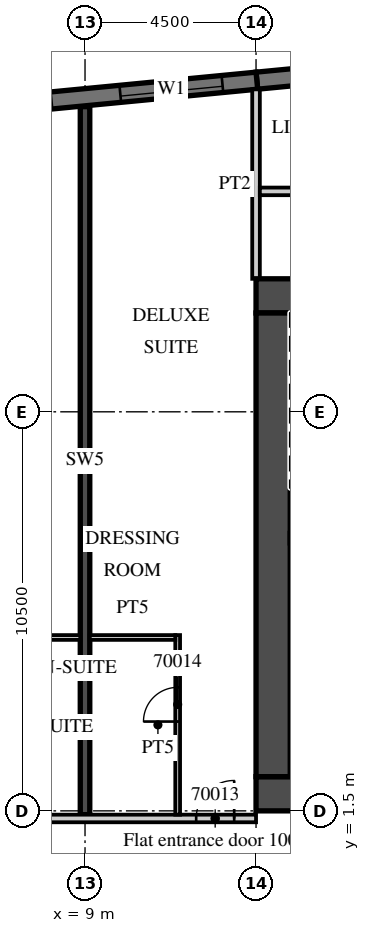
"""IFC4 building model, lengths in metres.
Left out: names, types, materials, properties, quantities, classifications, styles, units other than length and angle.
Written with IfcOpenShell. Run it as: python <this file> out.ifc"""

import sys

from ifc_helpers import new_model, si_unit, direction, frame, frame_2d, origin, place, context, subcontext, project, spatial, rectangle, extrude, element, fill, save


model = new_model("IFC4")
c1 = context("Model", 3, precision=1e-05, world=origin(), true_north=direction((0.0, 1.0)))
c2 = subcontext(c1, "Body", "Model", "MODEL_VIEW")
j1 = project(units=[si_unit("LENGTHUNIT", "METRE"), si_unit("PLANEANGLEUNIT", "RADIAN")], contexts=[c1])
p1 = place(None, origin())
s1 = spatial("IfcSite", under=j1, at=p1, CompositionType="ELEMENT")
p2 = place(p1, origin())
s2 = spatial("IfcBuilding", under=s1, at=p2, CompositionType="ELEMENT")
p3 = place(p2, frame((0.0, 0.0, 281.7)))
s3 = spatial("IfcBuildingStorey", under=s2, at=p3, CompositionType="ELEMENT", Elevation=281.7)
p4 = place(p3, frame((9.0, 1.4, 0.0), z_axis=(0.0, 0.0, 1.0), x_axis=(0.0, 1.0, 0.0)))
e1 = element("IfcWall", 1, at=p4, inside=s3, PredefinedType="SHEAR", context=c2, shape_type="SweptSolid", body=[
    extrude(rectangle(XDim=18.629, YDim=0.25, at=frame_2d((9.315, 0.0))), origin(), (0.0, 0.0, 1.0), 3.3),
])
p5 = place(p3, frame((30.946, 22.391, 0.0), z_axis=(0.0, 0.0, 1.0), x_axis=(-0.995396397117, -0.095843688398, 0.0)))
e2 = element("IfcWall", 2, at=p5, inside=s3, PredefinedType="SOLIDWALL", context=c2, shape_type="SweptSolid", body=[
    extrude(rectangle(XDim=17.505, YDim=0.45, at=frame_2d((8.752, 0.0))), origin(), (0.0, 0.0, 1.0), 3.02),
])
p6 = place(p3, frame((13.521, 20.713, 0.0), z_axis=(0.0, 0.0, 1.0), x_axis=(-0.995396277313, -0.095844932638, 0.0)))
e3 = element("IfcWall", 3, at=p6, inside=s3, PredefinedType="SOLIDWALL", context=c2, shape_type="SweptSolid", body=[
    extrude(rectangle(XDim=51.495, YDim=0.45, at=frame_2d((25.748, 0.0))), origin(), (0.0, 0.0, 1.0), 3.02),
])
p7 = place(p6, frame((0.91, 0.0, 0.45)))
e4 = element("IfcOpeningElement", 4, at=p7, cuts=e3, PredefinedType="OPENING", context=c2, shape_type="SweptSolid", body=[
    extrude(rectangle(XDim=2.7, YDim=2.25, at=frame_2d((1.35, 1.125))), frame((0.0, 0.235, 0.0), z_axis=(0.0, -1.0, 0.0), x_axis=(1.0, 0.0, 0.0)), (0.0, 0.0, 1.0), 0.47),
])
p8 = place(p6, frame((5.431, 0.0, 0.45)))
e5 = element("IfcOpeningElement", 5, at=p8, cuts=e3, PredefinedType="OPENING", context=c2, shape_type="SweptSolid", body=[
    extrude(rectangle(XDim=2.7, YDim=2.25, at=frame_2d((1.35, 1.125))), frame((0.0, 0.235, 0.0), z_axis=(0.0, -1.0, 0.0), x_axis=(1.0, 0.0, 0.0)), (0.0, 0.0, 1.0), 0.47),
])
p9 = place(p6, frame((9.952, 0.0, 0.45)))
e6 = element("IfcOpeningElement", 6, at=p9, cuts=e3, PredefinedType="OPENING", context=c2, shape_type="SweptSolid", body=[
    extrude(rectangle(XDim=2.7, YDim=2.25, at=frame_2d((1.35, 1.125))), frame((0.0, 0.235, 0.0), z_axis=(0.0, -1.0, 0.0), x_axis=(1.0, 0.0, 0.0)), (0.0, 0.0, 1.0), 0.47),
])
p10 = place(p6, frame((14.473, 0.0, 0.45)))
e7 = element("IfcOpeningElement", 7, at=p10, cuts=e3, PredefinedType="OPENING", context=c2, shape_type="SweptSolid", body=[
    extrude(rectangle(XDim=2.7, YDim=2.25, at=frame_2d((1.35, 1.125))), frame((0.0, 0.235, 0.0), z_axis=(0.0, -1.0, 0.0), x_axis=(1.0, 0.0, 0.0)), (0.0, 0.0, 1.0), 0.47),
])
p11 = place(p6, frame((18.994, 0.0, 0.45)))
e8 = element("IfcOpeningElement", 8, at=p11, cuts=e3, PredefinedType="OPENING", context=c2, shape_type="SweptSolid", body=[
    extrude(rectangle(XDim=2.7, YDim=2.25, at=frame_2d((1.35, 1.125))), frame((0.0, 0.235, 0.0), z_axis=(0.0, -1.0, 0.0), x_axis=(1.0, 0.0, 0.0)), (0.0, 0.0, 1.0), 0.47),
])
p12 = place(p6, frame((23.514, 0.0, 0.45)))
e9 = element("IfcOpeningElement", 9, at=p12, cuts=e3, PredefinedType="OPENING", context=c2, shape_type="SweptSolid", body=[
    extrude(rectangle(XDim=2.7, YDim=2.25, at=frame_2d((1.35, 1.125))), frame((0.0, 0.235, 0.0), z_axis=(0.0, -1.0, 0.0), x_axis=(1.0, 0.0, 0.0)), (0.0, 0.0, 1.0), 0.47),
])
p13 = place(p6, frame((28.035, 0.0, 0.45)))
e10 = element("IfcOpeningElement", 10, at=p13, cuts=e3, PredefinedType="OPENING", context=c2, shape_type="SweptSolid", body=[
    extrude(rectangle(XDim=2.7, YDim=2.25, at=frame_2d((1.35, 1.125))), frame((0.0, 0.235, 0.0), z_axis=(0.0, -1.0, 0.0), x_axis=(1.0, 0.0, 0.0)), (0.0, 0.0, 1.0), 0.47),
])
p14 = place(p6, frame((32.556, 0.0, 0.45)))
e11 = element("IfcOpeningElement", 11, at=p14, cuts=e3, PredefinedType="OPENING", context=c2, shape_type="SweptSolid", body=[
    extrude(rectangle(XDim=2.7, YDim=2.25, at=frame_2d((1.35, 1.125))), frame((0.0, 0.235, 0.0), z_axis=(0.0, -1.0, 0.0), x_axis=(1.0, 0.0, 0.0)), (0.0, 0.0, 1.0), 0.47),
])
p15 = place(p6, frame((37.077, 0.0, 0.45)))
e12 = element("IfcOpeningElement", 12, at=p15, cuts=e3, PredefinedType="OPENING", context=c2, shape_type="SweptSolid", body=[
    extrude(rectangle(XDim=2.7, YDim=2.25, at=frame_2d((1.35, 1.125))), frame((0.0, 0.235, 0.0), z_axis=(0.0, -1.0, 0.0), x_axis=(1.0, 0.0, 0.0)), (0.0, 0.0, 1.0), 0.47),
])
p16 = place(p6, frame((41.598, 0.0, 0.45)))
e13 = element("IfcOpeningElement", 13, at=p16, cuts=e3, PredefinedType="OPENING", context=c2, shape_type="SweptSolid", body=[
    extrude(rectangle(XDim=2.7, YDim=2.25, at=frame_2d((1.35, 1.125))), frame((0.0, 0.235, 0.0), z_axis=(0.0, -1.0, 0.0), x_axis=(1.0, 0.0, 0.0)), (0.0, 0.0, 1.0), 0.47),
])
p17 = place(p6, frame((46.118, 0.0, 0.45)))
e14 = element("IfcOpeningElement", 14, at=p17, cuts=e3, PredefinedType="OPENING", context=c2, shape_type="SweptSolid", body=[
    extrude(rectangle(XDim=2.7, YDim=2.25, at=frame_2d((1.35, 1.125))), frame((0.0, 0.235, 0.0), z_axis=(0.0, -1.0, 0.0), x_axis=(1.0, 0.0, 0.0)), (0.0, 0.0, 1.0), 0.47),
])
p18 = place(p3, frame((13.5, 15.5, 0.0), z_axis=(0.0, 0.0, 1.0), x_axis=(0.0, 1.0, 0.0)))
e15 = element("IfcWall", 15, at=p18, inside=s3, PredefinedType="PARTITIONING", context=c2, shape_type="SweptSolid", body=[
    extrude(rectangle(XDim=4.985, YDim=0.2, at=frame_2d((2.493, 0.0))), origin(), (0.0, 0.0, 1.0), 3.02),
])
p19 = place(p3, frame((-39.909, 1.3, 0.0), z_axis=(0.0, 0.0, 1.0), x_axis=(1.0, 0.0, 0.0)))
e16 = element("IfcWall", 16, at=p19, inside=s3, PredefinedType="PARTITIONING", context=c2, shape_type="SweptSolid", body=[
    extrude(rectangle(XDim=53.409, YDim=0.2, at=frame_2d((26.705, 0.0))), origin(), (0.0, 0.0, 1.0), 3.02),
])
p20 = place(p19, frame((0.15, 0.0, 0.0)))
e17 = element("IfcOpeningElement", 17, at=p20, cuts=e16, PredefinedType="OPENING", context=c2, shape_type="SweptSolid", body=[
    extrude(rectangle(XDim=0.9, YDim=2.1, at=frame_2d((0.45, 1.05))), frame((0.0, 0.11, 0.0), z_axis=(0.0, -1.0, 0.0), x_axis=(1.0, 0.0, 0.0)), (0.0, 0.0, 1.0), 0.22),
])
p21 = place(p19, frame((6.347, 0.0, 0.0)))
e18 = element("IfcOpeningElement", 18, at=p21, cuts=e16, PredefinedType="OPENING", context=c2, shape_type="SweptSolid", body=[
    extrude(rectangle(XDim=1.2, YDim=2.1, at=frame_2d((0.6, 1.05))), frame((0.0, 0.11, 0.0), z_axis=(0.0, -1.0, 0.0), x_axis=(1.0, 0.0, 0.0)), (0.0, 0.0, 1.0), 0.22),
])
p22 = place(p19, frame((15.347, 0.0, 0.0)))
e19 = element("IfcOpeningElement", 19, at=p22, cuts=e16, PredefinedType="OPENING", context=c2, shape_type="SweptSolid", body=[
    extrude(rectangle(XDim=1.2, YDim=2.1, at=frame_2d((0.6, 1.05))), frame((0.0, 0.11, 0.0), z_axis=(0.0, -1.0, 0.0), x_axis=(1.0, 0.0, 0.0)), (0.0, 0.0, 1.0), 0.22),
])
p23 = place(p19, frame((24.346, 0.0, 0.0)))
e20 = element("IfcOpeningElement", 20, at=p23, cuts=e16, PredefinedType="OPENING", context=c2, shape_type="SweptSolid", body=[
    extrude(rectangle(XDim=1.2, YDim=2.1, at=frame_2d((0.6, 1.05))), frame((0.0, 0.11, 0.0), z_axis=(0.0, -1.0, 0.0), x_axis=(1.0, 0.0, 0.0)), (0.0, 0.0, 1.0), 0.22),
])
p24 = place(p19, frame((33.346, 0.0, 0.0)))
e21 = element("IfcOpeningElement", 21, at=p24, cuts=e16, PredefinedType="OPENING", context=c2, shape_type="SweptSolid", body=[
    extrude(rectangle(XDim=1.2, YDim=2.1, at=frame_2d((0.6, 1.05))), frame((0.0, 0.11, 0.0), z_axis=(0.0, -1.0, 0.0), x_axis=(1.0, 0.0, 0.0)), (0.0, 0.0, 1.0), 0.22),
])
p25 = place(p19, frame((42.346, 0.0, 0.0)))
e22 = element("IfcOpeningElement", 22, at=p25, cuts=e16, PredefinedType="OPENING", context=c2, shape_type="SweptSolid", body=[
    extrude(rectangle(XDim=1.2, YDim=2.1, at=frame_2d((0.6, 1.05))), frame((0.0, 0.11, 0.0), z_axis=(0.0, -1.0, 0.0), x_axis=(1.0, 0.0, 0.0)), (0.0, 0.0, 1.0), 0.22),
])
p26 = place(p19, frame((51.834, 0.0, 0.0)))
e23 = element("IfcOpeningElement", 23, at=p26, cuts=e16, PredefinedType="OPENING", context=c2, shape_type="SweptSolid", body=[
    extrude(rectangle(XDim=1.0, YDim=2.1, at=frame_2d((0.5, 1.05))), frame((0.0, 0.11, 0.0), z_axis=(0.0, -1.0, 0.0), x_axis=(1.0, 0.0, 0.0)), (0.0, 0.0, 1.0), 0.22),
])
p27 = place(p3, frame((6.075, 6.062, 0.0), z_axis=(0.0, 0.0, 1.0), x_axis=(1.0, 0.0, 0.0)))
e24 = element("IfcWall", 24, at=p27, inside=s3, PredefinedType="PARTITIONING", context=c2, shape_type="SweptSolid", body=[
    extrude(rectangle(XDim=2.8, YDim=0.125, at=frame_2d((1.4, 0.0))), origin(), (0.0, 0.0, 1.0), 3.02),
])
p28 = place(p3, frame((11.438, 1.4, 0.0), z_axis=(0.0, 0.0, 1.0), x_axis=(0.0, 1.0, 0.0)))
e25 = element("IfcWall", 25, at=p28, inside=s3, PredefinedType="PARTITIONING", context=c2, shape_type="SweptSolid", body=[
    extrude(rectangle(XDim=4.725, YDim=0.125, at=frame_2d((2.363, 0.0))), origin(), (0.0, 0.0, 1.0), 3.02),
])
p29 = place(p28, frame((2.45, 0.0, 0.0)))
e26 = element("IfcOpeningElement", 26, at=p29, cuts=e25, PredefinedType="OPENING", context=c2, shape_type="SweptSolid", body=[
    extrude(rectangle(XDim=0.9, YDim=2.1, at=frame_2d((0.45, 1.05))), frame((0.0, 0.073, 0.0), z_axis=(0.0, -1.0, 0.0), x_axis=(1.0, 0.0, 0.0)), (0.0, 0.0, 1.0), 0.145),
])
p30 = place(p3, frame((9.125, 6.062, 0.0), z_axis=(0.0, 0.0, 1.0), x_axis=(1.0, 0.0, 0.0)))
e27 = element("IfcWall", 27, at=p30, inside=s3, PredefinedType="PARTITIONING", context=c2, shape_type="SweptSolid", body=[
    extrude(rectangle(XDim=2.25, YDim=0.125, at=frame_2d((1.125, 0.0))), origin(), (0.0, 0.0, 1.0), 3.02),
])
p31 = place(p3, frame((13.5, 1.95, 0.0), z_axis=(0.0, 0.0, 1.0), x_axis=(1.0, 0.0, 0.0)))
e28 = element("IfcWall", 28, at=p31, inside=s3, PredefinedType="SHEAR", context=c2, shape_type="SweptSolid", body=[
    extrude(rectangle(XDim=18.0, YDim=0.9, at=frame_2d((9.0, 0.0))), origin(), (0.0, 0.0, 1.0), 3.02),
])
p32 = place(p31, frame((1.475, 0.0, 0.0)))
e29 = element("IfcOpeningElement", 29, at=p32, cuts=e28, PredefinedType="OPENING", context=c2, shape_type="SweptSolid", body=[
    extrude(rectangle(XDim=1.8, YDim=2.1, at=frame_2d((0.9, 1.05))), frame((0.0, 0.46, 0.0), z_axis=(0.0, -1.0, 0.0), x_axis=(1.0, 0.0, 0.0)), (0.0, 0.0, 1.0), 0.92),
])
p33 = place(p3, frame((13.5, 15.05, 0.0), z_axis=(0.0, 0.0, 1.0), x_axis=(1.0, 0.0, 0.0)))
e30 = element("IfcWall", 30, at=p33, inside=s3, PredefinedType="SHEAR", context=c2, shape_type="SweptSolid", body=[
    extrude(rectangle(XDim=6.8, YDim=0.9, at=frame_2d((3.4, 0.0))), origin(), (0.0, 0.0, 1.0), 3.02),
])
p34 = place(p33, frame((4.725, 0.0, 0.0)))
e31 = element("IfcOpeningElement", 31, at=p34, cuts=e30, PredefinedType="OPENING", context=c2, shape_type="SweptSolid", body=[
    extrude(rectangle(XDim=1.2, YDim=2.1, at=frame_2d((0.6, 1.05))), frame((0.0, 0.46, 0.0), z_axis=(0.0, -1.0, 0.0), x_axis=(1.0, 0.0, 0.0)), (0.0, 0.0, 1.0), 0.92),
])
p35 = place(p3, frame((13.95, 2.4, 0.0), z_axis=(0.0, 0.0, 1.0), x_axis=(0.0, 1.0, 0.0)))
e32 = element("IfcWall", 32, at=p35, inside=s3, PredefinedType="SHEAR", context=c2, shape_type="SweptSolid", body=[
    extrude(rectangle(XDim=12.2, YDim=0.9, at=frame_2d((6.1, 0.0))), origin(), (0.0, 0.0, 1.0), 3.02),
])
p36 = place(p3, frame((13.6, 17.8, 0.0), z_axis=(0.0, 0.0, 1.0), x_axis=(1.0, 0.0, 0.0)))
e33 = element("IfcWall", 33, at=p36, inside=s3, PredefinedType="PARTITIONING", context=c2, shape_type="SweptSolid", body=[
    extrude(rectangle(XDim=21.354, YDim=0.2, at=frame_2d((10.677, 0.0))), origin(), (0.0, 0.0, 1.0), 3.02),
])
p37 = place(p36, frame((16.613, 0.0, 0.0)))
e34 = element("IfcOpeningElement", 34, at=p37, cuts=e33, PredefinedType="OPENING", context=c2, shape_type="SweptSolid", body=[
    extrude(rectangle(XDim=0.9, YDim=2.1, at=frame_2d((0.45, 1.05))), frame((0.0, 0.11, 0.0), z_axis=(0.0, -1.0, 0.0), x_axis=(1.0, 0.0, 0.0)), (0.0, 0.0, 1.0), 0.22),
])
p38 = place(p36, frame((8.312, 0.0, 0.0)))
e35 = element("IfcOpeningElement", 35, at=p38, cuts=e33, PredefinedType="OPENING", context=c2, shape_type="SweptSolid", body=[
    extrude(rectangle(XDim=0.9, YDim=2.1, at=frame_2d((0.45, 1.05))), frame((0.0, 0.11, 0.0), z_axis=(0.0, -1.0, 0.0), x_axis=(1.0, 0.0, 0.0)), (0.0, 0.0, 1.0), 0.22),
])
p39 = place(p7, origin())
e36 = element("IfcWindow", 36, at=p39, inside=s3, PartitioningType="SINGLE_PANEL", PredefinedType="WINDOW", context=c2, shape_type="SweptSolid", body=[
    extrude(rectangle(XDim=2.7, YDim=2.25, at=frame_2d((1.35, 1.125))), frame((0.0, 0.09, 0.0), z_axis=(0.0, -1.0, 0.0), x_axis=(1.0, 0.0, 0.0)), (0.0, 0.0, 1.0), 0.06),
])
fill(e4, e36)
p40 = place(p26, origin())
e37 = element("IfcDoor", 37, at=p40, inside=s3, OperationType="SINGLE_SWING_RIGHT", PredefinedType="DOOR", context=c2, shape_type="SweptSolid", body=[
    extrude(rectangle(XDim=1.0, YDim=2.1, at=frame_2d((0.5, 1.05))), frame((0.0, 0.025, 0.0), z_axis=(0.0, -1.0, 0.0), x_axis=(1.0, 0.0, 0.0)), (0.0, 0.0, 1.0), 0.05),
])
fill(e23, e37)
p41 = place(p29, origin())
e38 = element("IfcDoor", 38, at=p41, inside=s3, OperationType="SINGLE_SWING_LEFT", PredefinedType="DOOR", context=c2, shape_type="SweptSolid", body=[
    extrude(rectangle(XDim=0.9, YDim=2.1, at=frame_2d((0.45, 1.05))), frame((0.0, 0.025, 0.0), z_axis=(0.0, -1.0, 0.0), x_axis=(1.0, 0.0, 0.0)), (0.0, 0.0, 1.0), 0.05),
])
fill(e26, e38)
save(model, sys.argv[1])
